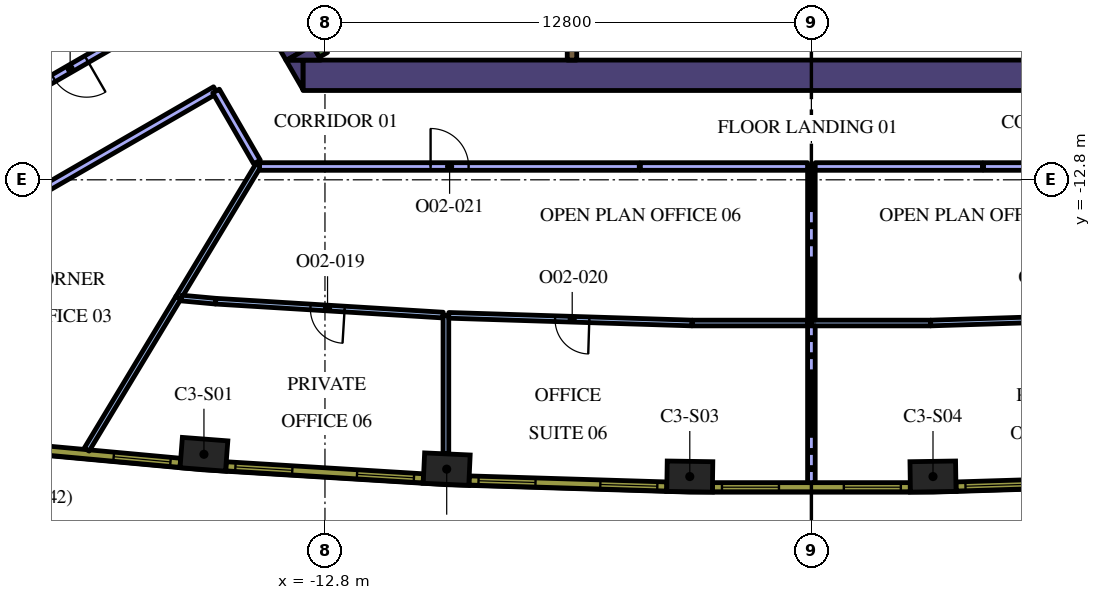
"""IFC4 building model, lengths in metres.
Left out: names, types, materials, properties, quantities, classifications, styles, units other than length and angle.
Written with IfcOpenShell. Run it as: python <this file> out.ifc"""

import sys

from ifc_helpers import new_model, si_unit, direction, frame, frame_2d, origin, origin_2d, place, context, subcontext, project, spatial, polyline, rectangle, outline, extrude, element, fill, save


model = new_model("IFC4")
c1 = context("Model", 3, precision=1e-05, world=origin(), true_north=direction((0.0, 1.0)))
c2 = subcontext(c1, "Body", "Model", "MODEL_VIEW")
j1 = project(units=[si_unit("LENGTHUNIT", "METRE"), si_unit("PLANEANGLEUNIT", "RADIAN")], contexts=[c1])
p1 = place(None, origin())
s1 = spatial("IfcSite", under=j1, at=p1, CompositionType="ELEMENT")
p2 = place(p1, origin())
s2 = spatial("IfcBuilding", under=s1, at=p2, CompositionType="ELEMENT")
p3 = place(p2, frame((0.0, 0.0, 162.6)))
s3 = spatial("IfcBuildingStorey", under=s2, at=p3, CompositionType="ELEMENT", Elevation=162.6)
for number, where, z_axis, x_axis in (
    (1, (-15.985, -20.022, 0.0), (0.0, 0.0, 1.0), (0.997, -0.076, 0.0)),
    (2, (-9.597, -20.413, 0.0), (0.0, 0.0, 1.0), (0.999, -0.046, 0.0)),
    (3, (-3.2, -20.608, 0.0), (0.0, 0.0, 1.0), (1.0, -0.015, 0.0)),
    (4, (3.2, -20.608, 0.0), (0.0, 0.0, 1.0), (1.0, 0.015, 0.0)),
):
    element("IfcColumn", number, at=place(p3, frame(where, z_axis=z_axis, x_axis=x_axis)), inside=s3, PredefinedType="COLUMN", context=c2, shape_type="SweptSolid", body=[
        extrude(rectangle(XDim=1.2, YDim=0.8, at=origin_2d()), origin(), (0.0, 0.0, 1.0), 4.2),
    ])
p4 = place(p3, frame((-13.378, -10.05, 0.0), z_axis=(0.0, 0.0, 1.0), x_axis=(1.0, 0.0, 0.0)))
e5 = element("IfcWall", 5, at=p4, inside=s3, PredefinedType="SOLIDWALL", context=c2, shape_type="SweptSolid", body=[
    extrude(rectangle(XDim=22.282, YDim=0.8, at=frame_2d((11.141, 0.0))), origin(), (0.0, 0.0, 1.0), 4.2),
])
p5 = place(p3, origin())
e6 = element("IfcWall", 6, at=p5, inside=s3, PredefinedType="SOLIDWALL", context=c2, shape_type="SweptSolid", body=[
    extrude(outline(polyline([(-13.828, -9.65), (-13.38, -9.65), (-13.38, -10.426), (-13.828, -9.65)])), origin(), (0.0, 0.0, 1.0), 4.2),
])
p6 = place(p3, frame((-15.387, -6.148, 0.0), z_axis=(0.0, 0.0, 1.0), x_axis=(0.499984020225, -0.866034629516, 0.0)))
e7 = element("IfcWall", 7, at=p6, inside=s3, PredefinedType="SOLIDWALL", context=c2, shape_type="SweptSolid", body=[
    extrude(rectangle(XDim=3.824, YDim=0.8, at=frame_2d((1.912, 0.0))), origin(), (0.0, 0.0, 1.0), 4.2),
])
e8 = element("IfcWall", 8, at=p5, inside=s3, PredefinedType="SOLIDWALL", context=c2, shape_type="SweptSolid", body=[
    extrude(outline(polyline([(-12.904, -9.65), (-13.8, -9.65), (-13.128, -9.262), (-12.904, -9.65)])), origin(), (0.0, 0.0, 1.0), 4.2),
])
p7 = place(p3, frame((-12.84, -9.511, 0.0), z_axis=(0.0, 0.0, 1.0), x_axis=(-0.499997733992, 0.866026712061, 0.0)))
e9 = element("IfcWall", 9, at=p7, inside=s3, PredefinedType="SOLIDWALL", context=c2, shape_type="SweptSolid", body=[
    extrude(rectangle(XDim=3.634, YDim=0.25, at=frame_2d((1.817, 0.0))), origin(), (0.0, 0.0, 1.0), 4.2),
])
p8 = place(p3, frame((-6.3, -8.925, 0.0), z_axis=(0.0, 0.0, 1.0), x_axis=(0.0, -1.0, 0.0)))
e10 = element("IfcWall", 10, at=p8, inside=s3, PredefinedType="SOLIDWALL", context=c2, shape_type="SweptSolid", body=[
    extrude(rectangle(XDim=0.725, YDim=0.25, at=frame_2d((0.363, 0.0))), origin(), (0.0, 0.0, 1.0), 4.2),
])
p9 = place(p3, frame((0.0, -16.568, 0.0), z_axis=(0.0, 0.0, 1.0), x_axis=(1.0, 0.0, 0.0)))
e11 = element("IfcWall", 11, at=p9, inside=s3, PredefinedType="PARTITIONING", context=c2, shape_type="SweptSolid", body=[
    extrude(rectangle(XDim=3.138, YDim=0.15, at=frame_2d((1.569, 0.0))), origin(), (0.0, 0.0, 1.0), 3.15),
])
p10 = place(p3, frame((9.542, -16.366, 0.0), z_axis=(0.0, 0.0, 1.0), x_axis=(-0.999504575396, -0.031473858384, 0.0)))
e12 = element("IfcWall", 12, at=p10, inside=s3, PredefinedType="PARTITIONING", context=c2, shape_type="SweptSolid", body=[
    extrude(rectangle(XDim=6.407, YDim=0.15, at=frame_2d((3.204, 0.0))), origin(), (0.0, 0.0, 1.0), 3.15),
])
p11 = place(p10, frame((2.707, 0.0, 0.0)))
e13 = element("IfcOpeningElement", 13, at=p11, cuts=e12, PredefinedType="OPENING", context=c2, shape_type="SweptSolid", body=[
    extrude(rectangle(XDim=0.9, YDim=2.1, at=frame_2d((0.45, 1.05))), frame((0.0, 0.085, 0.0), z_axis=(0.0, -1.0, 0.0), x_axis=(1.0, 0.0, 0.0)), (0.0, 0.0, 1.0), 0.17),
])
p12 = place(p3, frame((0.0, -20.768, 0.0), z_axis=(0.0, 0.0, 1.0), x_axis=(0.0, 1.0, 0.0)))
e14 = element("IfcWall", 14, at=p12, inside=s3, PredefinedType="PARTITIONING", context=c2, shape_type="SweptSolid", body=[
    extrude(rectangle(XDim=4.125, YDim=0.2, at=frame_2d((2.062, 0.0))), origin(), (0.0, 0.0, 1.0), 3.15),
])
p13 = place(p3, frame((0.0, -16.493, 0.0), z_axis=(0.0, 0.0, 1.0), x_axis=(0.0, 1.0, 0.0)))
e15 = element("IfcWall", 15, at=p13, inside=s3, PredefinedType="PARTITIONING", context=c2, shape_type="SweptSolid", body=[
    extrude(rectangle(XDim=4.043, YDim=0.2, at=frame_2d((2.021, 0.0))), origin(), (0.0, 0.0, 1.0), 3.15),
])
p14 = place(p3, frame((0.1, -12.45, 0.0), z_axis=(0.0, 0.0, 1.0), x_axis=(1.0, 0.0, 0.0)))
e16 = element("IfcWall", 16, at=p14, inside=s3, PredefinedType="PARTITIONING", context=c2, shape_type="SweptSolid", body=[
    extrude(rectangle(XDim=4.4, YDim=0.2, at=frame_2d((2.2, 0.0))), origin(), (0.0, 0.0, 1.0), 3.15),
])
p15 = place(p3, frame((4.53, -12.45, 0.0), z_axis=(0.0, 0.0, 1.0), x_axis=(1.0, 0.0, 0.0)))
e17 = element("IfcWall", 17, at=p15, inside=s3, PredefinedType="PARTITIONING", context=c2, shape_type="SweptSolid", body=[
    extrude(rectangle(XDim=9.99, YDim=0.2, at=frame_2d((4.995, 0.0))), origin(), (0.0, 0.0, 1.0), 3.15),
])
p16 = place(p15, frame((4.5, 0.0, 0.0)))
e18 = element("IfcOpeningElement", 18, at=p16, cuts=e17, PredefinedType="OPENING", context=c2, shape_type="SweptSolid", body=[
    extrude(rectangle(XDim=1.0, YDim=2.1, at=frame_2d((0.5, 1.05))), frame((0.0, 0.11, 0.0), z_axis=(0.0, -1.0, 0.0), x_axis=(1.0, 0.0, 0.0)), (0.0, 0.0, 1.0), 0.22),
])
p17 = place(p3, frame((-16.656, -15.9, 0.0), z_axis=(0.0, 0.0, 1.0), x_axis=(-0.516845255261, -0.856078841062, 0.0)))
e19 = element("IfcWall", 19, at=p17, inside=s3, PredefinedType="PARTITIONING", context=c2, shape_type="SweptSolid", body=[
    extrude(rectangle(XDim=4.672, YDim=0.15, at=frame_2d((2.336, 0.0))), origin(), (0.0, 0.0, 1.0), 3.15),
])
p18 = place(p3, frame((-14.546, -12.406, 0.0), z_axis=(0.0, 0.0, 1.0), x_axis=(-0.516811321583, -0.856099327113, 0.0)))
e20 = element("IfcWall", 20, at=p18, inside=s3, PredefinedType="PARTITIONING", context=c2, shape_type="SweptSolid", body=[
    extrude(rectangle(XDim=4.09, YDim=0.15, at=frame_2d((2.045, 0.0))), origin(), (0.0, 0.0, 1.0), 3.15),
])
p19 = place(p3, frame((-16.907, -8.376, 0.0), z_axis=(0.0, 0.0, 1.0), x_axis=(-0.866017375886, -0.50001390447, 0.0)))
e21 = element("IfcWall", 21, at=p19, inside=s3, PredefinedType="PARTITIONING", context=c2, shape_type="SweptSolid", body=[
    extrude(rectangle(XDim=5.97, YDim=0.2, at=frame_2d((2.985, 0.0))), origin(), (0.0, 0.0, 1.0), 3.15),
])
p20 = place(p19, frame((2.5, 0.0, 0.0)))
e22 = element("IfcOpeningElement", 22, at=p20, cuts=e21, PredefinedType="OPENING", context=c2, shape_type="SweptSolid", body=[
    extrude(rectangle(XDim=1.0, YDim=2.1, at=frame_2d((0.5, 1.05))), frame((0.0, 0.11, 0.0), z_axis=(0.0, -1.0, 0.0), x_axis=(1.0, 0.0, 0.0)), (0.0, 0.0, 1.0), 0.22),
])
p21 = place(p3, frame((-20.851, -13.424, 0.0), z_axis=(0.0, 0.0, 1.0), x_axis=(0.866007151214, 0.500031613047, 0.0)))
e23 = element("IfcWall", 23, at=p21, inside=s3, PredefinedType="PARTITIONING", context=c2, shape_type="SweptSolid", body=[
    extrude(rectangle(XDim=5.97, YDim=0.2, at=frame_2d((2.985, 0.0))), origin(), (0.0, 0.0, 1.0), 3.15),
])
p22 = place(p3, frame((-15.666, -10.465, 0.0), z_axis=(0.0, 0.0, 1.0), x_axis=(0.499977443261, -0.866038426532, 0.0)))
e24 = element("IfcWall", 24, at=p22, inside=s3, PredefinedType="PARTITIONING", context=c2, shape_type="SweptSolid", body=[
    extrude(rectangle(XDim=2.155, YDim=0.2, at=frame_2d((1.077, 0.0))), origin(), (0.0, 0.0, 1.0), 3.15),
])
p23 = place(p3, frame((-9.617, -16.364, 0.0), z_axis=(0.0, 0.0, 1.0), x_axis=(0.0, -1.0, 0.0)))
e25 = element("IfcWall", 25, at=p23, inside=s3, PredefinedType="PARTITIONING", context=c2, shape_type="SweptSolid", body=[
    extrude(rectangle(XDim=3.647, YDim=0.15, at=frame_2d((1.824, 0.0))), origin(), (0.0, 0.0, 1.0), 3.15),
])
p24 = place(p3, frame((-16.575, -15.911, 0.0), z_axis=(0.0, 0.0, 1.0), x_axis=(0.995808489615, -0.09146284497, 0.0)))
e26 = element("IfcWall", 26, at=p24, inside=s3, PredefinedType="PARTITIONING", context=c2, shape_type="SweptSolid", body=[
    extrude(rectangle(XDim=0.902, YDim=0.15, at=frame_2d((0.451, 0.0))), origin(), (0.0, 0.0, 1.0), 3.15),
])
p25 = place(p3, frame((-9.692, -16.36, 0.0), z_axis=(0.0, 0.0, 1.0), x_axis=(-0.998135339661, 0.061039689709, 0.0)))
e27 = element("IfcWall", 27, at=p25, inside=s3, PredefinedType="PARTITIONING", context=c2, shape_type="SweptSolid", body=[
    extrude(rectangle(XDim=5.996, YDim=0.15, at=frame_2d((2.998, 0.0))), origin(), (0.0, 0.0, 1.0), 3.15),
])
p26 = place(p25, frame((2.595, 0.0, 0.0)))
e28 = element("IfcOpeningElement", 28, at=p26, cuts=e27, PredefinedType="OPENING", context=c2, shape_type="SweptSolid", body=[
    extrude(rectangle(XDim=0.9, YDim=2.1, at=frame_2d((0.45, 1.05))), frame((0.0, 0.085, 0.0), z_axis=(0.0, -1.0, 0.0), x_axis=(1.0, 0.0, 0.0)), (0.0, 0.0, 1.0), 0.17),
])
p27 = place(p3, frame((-3.138, -16.568, 0.0), z_axis=(0.0, 0.0, 1.0), x_axis=(-0.999504575396, 0.031473858384, 0.0)))
e29 = element("IfcWall", 29, at=p27, inside=s3, PredefinedType="PARTITIONING", context=c2, shape_type="SweptSolid", body=[
    extrude(rectangle(XDim=6.407, YDim=0.15, at=frame_2d((3.204, 0.0))), origin(), (0.0, 0.0, 1.0), 3.15),
])
p28 = place(p27, frame((2.707, 0.0, 0.0)))
e30 = element("IfcOpeningElement", 30, at=p28, cuts=e29, PredefinedType="OPENING", context=c2, shape_type="SweptSolid", body=[
    extrude(rectangle(XDim=0.9, YDim=2.1, at=frame_2d((0.45, 1.05))), frame((0.0, 0.085, 0.0), z_axis=(0.0, -1.0, 0.0), x_axis=(1.0, 0.0, 0.0)), (0.0, 0.0, 1.0), 0.17),
])
p29 = place(p3, frame((-3.138, -16.568, 0.0), z_axis=(0.0, 0.0, 1.0), x_axis=(1.0, 0.0, 0.0)))
e31 = element("IfcWall", 31, at=p29, inside=s3, PredefinedType="PARTITIONING", context=c2, shape_type="SweptSolid", body=[
    extrude(rectangle(XDim=3.038, YDim=0.15, at=frame_2d((1.519, 0.0))), origin(), (0.0, 0.0, 1.0), 3.15),
])
p30 = place(p3, frame((-4.5, -12.45, 0.0), z_axis=(0.0, 0.0, 1.0), x_axis=(1.0, 0.0, 0.0)))
e32 = element("IfcWall", 32, at=p30, inside=s3, PredefinedType="PARTITIONING", context=c2, shape_type="SweptSolid", body=[
    extrude(rectangle(XDim=4.4, YDim=0.2, at=frame_2d((2.2, 0.0))), origin(), (0.0, 0.0, 1.0), 3.15),
])
p31 = place(p3, frame((-14.521, -12.45, 0.0), z_axis=(0.0, 0.0, 1.0), x_axis=(1.0, 0.0, 0.0)))
e33 = element("IfcWall", 33, at=p31, inside=s3, PredefinedType="PARTITIONING", context=c2, shape_type="SweptSolid", body=[
    extrude(rectangle(XDim=9.99, YDim=0.2, at=frame_2d((4.995, 0.0))), origin(), (0.0, 0.0, 1.0), 3.15),
])
p32 = place(p31, frame((4.5, 0.0, 0.0)))
e34 = element("IfcOpeningElement", 34, at=p32, cuts=e33, PredefinedType="OPENING", context=c2, shape_type="SweptSolid", body=[
    extrude(rectangle(XDim=1.0, YDim=2.1, at=frame_2d((0.5, 1.05))), frame((0.0, 0.11, 0.0), z_axis=(0.0, -1.0, 0.0), x_axis=(1.0, 0.0, 0.0)), (0.0, 0.0, 1.0), 0.22),
])
p33 = place(p3, frame((-21.797, -19.77, 0.0), z_axis=(0.0, 0.0, 1.0), x_axis=(0.995808712151, -0.091460422067, 0.0)))
e35 = element("IfcWall", 35, at=p33, inside=s3, PredefinedType="SOLIDWALL", context=c2, shape_type="SweptSolid", body=[
    extrude(rectangle(XDim=5.213, YDim=0.24, at=frame_2d((2.606, 0.0))), origin(), (0.0, 0.0, 1.0), 3.95),
])
p34 = place(p33, frame((0.221, 0.0, 0.9)))
e36 = element("IfcOpeningElement", 36, at=p34, cuts=e35, PredefinedType="OPENING", context=c2, shape_type="SweptSolid", body=[
    extrude(rectangle(XDim=1.5, YDim=2.55, at=frame_2d((0.75, 1.275))), frame((0.0, 0.13, 0.0), z_axis=(0.0, -1.0, 0.0), x_axis=(1.0, 0.0, 0.0)), (0.0, 0.0, 1.0), 0.26),
])
p35 = place(p33, frame((3.452, 0.0, 0.9)))
e37 = element("IfcOpeningElement", 37, at=p35, cuts=e35, PredefinedType="OPENING", context=c2, shape_type="SweptSolid", body=[
    extrude(rectangle(XDim=1.5, YDim=2.55, at=frame_2d((0.75, 1.275))), frame((0.0, 0.13, 0.0), z_axis=(0.0, -1.0, 0.0), x_axis=(1.0, 0.0, 0.0)), (0.0, 0.0, 1.0), 0.26),
])
p36 = place(p3, frame((-15.405, -20.338, 0.0), z_axis=(0.0, 0.0, 1.0), x_axis=(0.998135294646, -0.061040425794, 0.0)))
e38 = element("IfcWall", 38, at=p36, inside=s3, PredefinedType="SOLIDWALL", context=c2, shape_type="SweptSolid", body=[
    extrude(rectangle(XDim=5.204, YDim=0.24, at=frame_2d((2.602, 0.0))), origin(), (0.0, 0.0, 1.0), 3.95),
])
p37 = place(p36, frame((0.248, 0.0, 0.9)))
e39 = element("IfcOpeningElement", 39, at=p37, cuts=e38, PredefinedType="OPENING", context=c2, shape_type="SweptSolid", body=[
    extrude(rectangle(XDim=1.5, YDim=2.55, at=frame_2d((0.75, 1.275))), frame((0.0, 0.13, 0.0), z_axis=(0.0, -1.0, 0.0), x_axis=(1.0, 0.0, 0.0)), (0.0, 0.0, 1.0), 0.26),
])
p38 = place(p36, frame((3.455, 0.0, 0.9)))
e40 = element("IfcOpeningElement", 40, at=p38, cuts=e38, PredefinedType="OPENING", context=c2, shape_type="SweptSolid", body=[
    extrude(rectangle(XDim=1.5, YDim=2.55, at=frame_2d((0.75, 1.275))), frame((0.0, 0.13, 0.0), z_axis=(0.0, -1.0, 0.0), x_axis=(1.0, 0.0, 0.0)), (0.0, 0.0, 1.0), 0.26),
])
p39 = place(p3, frame((-9.007, -20.711, 0.0), z_axis=(0.0, 0.0, 1.0), x_axis=(0.999533441983, -0.030543384845, 0.0)))
e41 = element("IfcWall", 41, at=p39, inside=s3, PredefinedType="SOLIDWALL", context=c2, shape_type="SweptSolid", body=[
    extrude(rectangle(XDim=5.204, YDim=0.24, at=frame_2d((2.602, 0.0))), origin(), (0.0, 0.0, 1.0), 3.95),
])
p40 = place(p39, frame((0.248, 0.0, 0.9)))
e42 = element("IfcOpeningElement", 42, at=p40, cuts=e41, PredefinedType="OPENING", context=c2, shape_type="SweptSolid", body=[
    extrude(rectangle(XDim=1.5, YDim=2.55, at=frame_2d((0.75, 1.275))), frame((0.0, 0.13, 0.0), z_axis=(0.0, -1.0, 0.0), x_axis=(1.0, 0.0, 0.0)), (0.0, 0.0, 1.0), 0.26),
])
p41 = place(p39, frame((3.455, 0.0, 0.9)))
e43 = element("IfcOpeningElement", 43, at=p41, cuts=e41, PredefinedType="OPENING", context=c2, shape_type="SweptSolid", body=[
    extrude(rectangle(XDim=1.5, YDim=2.55, at=frame_2d((0.75, 1.275))), frame((0.0, 0.13, 0.0), z_axis=(0.0, -1.0, 0.0), x_axis=(1.0, 0.0, 0.0)), (0.0, 0.0, 1.0), 0.26),
])
p42 = place(p3, frame((-2.602, -20.888, 0.0), z_axis=(0.0, 0.0, 1.0), x_axis=(1.0, 0.0, 0.0)))
e44 = element("IfcWall", 44, at=p42, inside=s3, PredefinedType="SOLIDWALL", context=c2, shape_type="SweptSolid", body=[
    extrude(rectangle(XDim=5.204, YDim=0.24, at=frame_2d((2.602, 0.0))), origin(), (0.0, 0.0, 1.0), 3.95),
])
p43 = place(p42, frame((0.248, 0.0, 0.9)))
e45 = element("IfcOpeningElement", 45, at=p43, cuts=e44, PredefinedType="OPENING", context=c2, shape_type="SweptSolid", body=[
    extrude(rectangle(XDim=1.5, YDim=2.55, at=frame_2d((0.75, 1.275))), frame((0.0, 0.13, 0.0), z_axis=(0.0, -1.0, 0.0), x_axis=(1.0, 0.0, 0.0)), (0.0, 0.0, 1.0), 0.26),
])
p44 = place(p42, frame((3.455, 0.0, 0.9)))
e46 = element("IfcOpeningElement", 46, at=p44, cuts=e44, PredefinedType="OPENING", context=c2, shape_type="SweptSolid", body=[
    extrude(rectangle(XDim=1.5, YDim=2.55, at=frame_2d((0.75, 1.275))), frame((0.0, 0.13, 0.0), z_axis=(0.0, -1.0, 0.0), x_axis=(1.0, 0.0, 0.0)), (0.0, 0.0, 1.0), 0.26),
])
p45 = place(p3, frame((3.806, -20.87, 0.0), z_axis=(0.0, 0.0, 1.0), x_axis=(0.999533441983, 0.030543384845, 0.0)))
e47 = element("IfcWall", 47, at=p45, inside=s3, PredefinedType="SOLIDWALL", context=c2, shape_type="SweptSolid", body=[
    extrude(rectangle(XDim=5.204, YDim=0.24, at=frame_2d((2.602, 0.0))), origin(), (0.0, 0.0, 1.0), 3.95),
])
p46 = place(p45, frame((0.248, 0.0, 0.9)))
e48 = element("IfcOpeningElement", 48, at=p46, cuts=e47, PredefinedType="OPENING", context=c2, shape_type="SweptSolid", body=[
    extrude(rectangle(XDim=1.5, YDim=2.55, at=frame_2d((0.75, 1.275))), frame((0.0, 0.13, 0.0), z_axis=(0.0, -1.0, 0.0), x_axis=(1.0, 0.0, 0.0)), (0.0, 0.0, 1.0), 0.26),
])
p47 = place(p45, frame((3.455, 0.0, 0.9)))
e49 = element("IfcOpeningElement", 49, at=p47, cuts=e47, PredefinedType="OPENING", context=c2, shape_type="SweptSolid", body=[
    extrude(rectangle(XDim=1.5, YDim=2.55, at=frame_2d((0.75, 1.275))), frame((0.0, 0.13, 0.0), z_axis=(0.0, -1.0, 0.0), x_axis=(1.0, 0.0, 0.0)), (0.0, 0.0, 1.0), 0.26),
])
p48 = place(p20, origin())
e50 = element("IfcDoor", 50, at=p48, inside=s3, OperationType="SINGLE_SWING_RIGHT", PredefinedType="DOOR", context=c2, shape_type="SweptSolid", body=[
    extrude(rectangle(XDim=1.0, YDim=2.1, at=frame_2d((0.5, 1.05))), frame((0.0, 0.025, 0.0), z_axis=(0.0, -1.0, 0.0), x_axis=(1.0, 0.0, 0.0)), (0.0, 0.0, 1.0), 0.05),
])
fill(e22, e50)
p49 = place(p26, origin())
e51 = element("IfcDoor", 51, at=p49, inside=s3, OperationType="SINGLE_SWING_RIGHT", PredefinedType="DOOR", context=c2, shape_type="SweptSolid", body=[
    extrude(rectangle(XDim=0.9, YDim=2.1, at=frame_2d((0.45, 1.05))), frame((0.0, 0.025, 0.0), z_axis=(0.0, -1.0, 0.0), x_axis=(1.0, 0.0, 0.0)), (0.0, 0.0, 1.0), 0.05),
])
fill(e28, e51)
p50 = place(p28, origin())
e52 = element("IfcDoor", 52, at=p50, inside=s3, OperationType="SINGLE_SWING_LEFT", PredefinedType="DOOR", context=c2, shape_type="SweptSolid", body=[
    extrude(rectangle(XDim=0.9, YDim=2.1, at=frame_2d((0.45, 1.05))), frame((0.0, 0.025, 0.0), z_axis=(0.0, -1.0, 0.0), x_axis=(1.0, 0.0, 0.0)), (0.0, 0.0, 1.0), 0.05),
])
fill(e30, e52)
p51 = place(p32, origin())
e53 = element("IfcDoor", 53, at=p51, inside=s3, OperationType="SINGLE_SWING_RIGHT", PredefinedType="DOOR", context=c2, shape_type="SweptSolid", body=[
    extrude(rectangle(XDim=1.0, YDim=2.1, at=frame_2d((0.5, 1.05))), frame((0.0, 0.025, 0.0), z_axis=(0.0, -1.0, 0.0), x_axis=(1.0, 0.0, 0.0)), (0.0, 0.0, 1.0), 0.05),
])
fill(e34, e53)
p52 = place(p35, origin())
e54 = element("IfcWindow", 54, at=p52, inside=s3, PartitioningType="SINGLE_PANEL", PredefinedType="WINDOW", context=c2, shape_type="SweptSolid", body=[
    extrude(rectangle(XDim=1.5, YDim=2.55, at=frame_2d((0.75, 1.275))), frame((0.0, 0.04, 0.0), z_axis=(0.0, -1.0, 0.0), x_axis=(1.0, 0.0, 0.0)), (0.0, 0.0, 1.0), 0.06),
])
fill(e37, e54)
p53 = place(p37, origin())
e55 = element("IfcWindow", 55, at=p53, inside=s3, PartitioningType="SINGLE_PANEL", PredefinedType="WINDOW", context=c2, shape_type="SweptSolid", body=[
    extrude(rectangle(XDim=1.5, YDim=2.55, at=frame_2d((0.75, 1.275))), frame((0.0, 0.04, 0.0), z_axis=(0.0, -1.0, 0.0), x_axis=(1.0, 0.0, 0.0)), (0.0, 0.0, 1.0), 0.06),
])
fill(e39, e55)
p54 = place(p38, origin())
e56 = element("IfcWindow", 56, at=p54, inside=s3, PartitioningType="SINGLE_PANEL", PredefinedType="WINDOW", context=c2, shape_type="SweptSolid", body=[
    extrude(rectangle(XDim=1.5, YDim=2.55, at=frame_2d((0.75, 1.275))), frame((0.0, 0.04, 0.0), z_axis=(0.0, -1.0, 0.0), x_axis=(1.0, 0.0, 0.0)), (0.0, 0.0, 1.0), 0.06),
])
fill(e40, e56)
p55 = place(p40, origin())
e57 = element("IfcWindow", 57, at=p55, inside=s3, PartitioningType="SINGLE_PANEL", PredefinedType="WINDOW", context=c2, shape_type="SweptSolid", body=[
    extrude(rectangle(XDim=1.5, YDim=2.55, at=frame_2d((0.75, 1.275))), frame((0.0, 0.04, 0.0), z_axis=(0.0, -1.0, 0.0), x_axis=(1.0, 0.0, 0.0)), (0.0, 0.0, 1.0), 0.06),
])
fill(e42, e57)
p56 = place(p41, origin())
e58 = element("IfcWindow", 58, at=p56, inside=s3, PartitioningType="SINGLE_PANEL", PredefinedType="WINDOW", context=c2, shape_type="SweptSolid", body=[
    extrude(rectangle(XDim=1.5, YDim=2.55, at=frame_2d((0.75, 1.275))), frame((0.0, 0.04, 0.0), z_axis=(0.0, -1.0, 0.0), x_axis=(1.0, 0.0, 0.0)), (0.0, 0.0, 1.0), 0.06),
])
fill(e43, e58)
p57 = place(p43, origin())
e59 = element("IfcWindow", 59, at=p57, inside=s3, PartitioningType="SINGLE_PANEL", PredefinedType="WINDOW", context=c2, shape_type="SweptSolid", body=[
    extrude(rectangle(XDim=1.5, YDim=2.55, at=frame_2d((0.75, 1.275))), frame((0.0, 0.04, 0.0), z_axis=(0.0, -1.0, 0.0), x_axis=(1.0, 0.0, 0.0)), (0.0, 0.0, 1.0), 0.06),
])
fill(e45, e59)
p58 = place(p44, origin())
e60 = element("IfcWindow", 60, at=p58, inside=s3, PartitioningType="SINGLE_PANEL", PredefinedType="WINDOW", context=c2, shape_type="SweptSolid", body=[
    extrude(rectangle(XDim=1.5, YDim=2.55, at=frame_2d((0.75, 1.275))), frame((0.0, 0.04, 0.0), z_axis=(0.0, -1.0, 0.0), x_axis=(1.0, 0.0, 0.0)), (0.0, 0.0, 1.0), 0.06),
])
fill(e46, e60)
p59 = place(p46, origin())
e61 = element("IfcWindow", 61, at=p59, inside=s3, PartitioningType="SINGLE_PANEL", PredefinedType="WINDOW", context=c2, shape_type="SweptSolid", body=[
    extrude(rectangle(XDim=1.5, YDim=2.55, at=frame_2d((0.75, 1.275))), frame((0.0, 0.04, 0.0), z_axis=(0.0, -1.0, 0.0), x_axis=(1.0, 0.0, 0.0)), (0.0, 0.0, 1.0), 0.06),
])
fill(e48, e61)
save(model, sys.argv[1])
